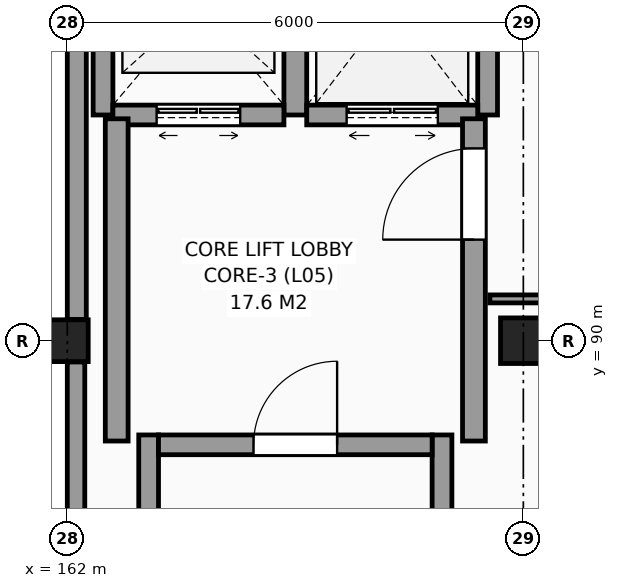
"""IFC4 building model, lengths in metres.
Left out: names, types, materials, properties, quantities, classifications, styles, units other than length and angle.
Written with IfcOpenShell. Run it as: python <this file> out.ifc"""

import sys

from ifc_helpers import new_model, si_unit, direction, frame, frame_2d, origin, origin_2d, place, context, subcontext, project, spatial, rectangle, extrude, element, fill, save


model = new_model("IFC4")
c1 = context("Model", 3, precision=1e-05, world=origin(), true_north=direction((0.0, 1.0)))
c2 = subcontext(c1, "Body", "Model", "MODEL_VIEW")
j1 = project(units=[si_unit("LENGTHUNIT", "METRE"), si_unit("PLANEANGLEUNIT", "RADIAN")], contexts=[c1])
p1 = place(None, origin())
s1 = spatial("IfcSite", under=j1, at=p1, CompositionType="ELEMENT")
p2 = place(p1, origin())
s2 = spatial("IfcBuilding", under=s1, at=p2, CompositionType="ELEMENT")
p3 = place(p2, frame((0.0, 0.0, 24.6)))
s3 = spatial("IfcBuildingStorey", under=s2, at=p3, CompositionType="ELEMENT", Elevation=24.6)
p4 = place(p3, frame((162.0, 90.0, 0.0), z_axis=(0.0, 0.0, 1.0), x_axis=(1.0, 0.0, 0.0)))
e1 = element("IfcColumn", 1, at=p4, inside=s3, PredefinedType="COLUMN", context=c2, shape_type="SweptSolid", body=[
    extrude(rectangle(XDim=0.55, YDim=0.55, at=origin_2d()), origin(), (0.0, 0.0, 1.0), 3.6),
])
p5 = place(p3, frame((168.0, 90.0, 0.0), z_axis=(0.0, 0.0, 1.0), x_axis=(1.0, 0.0, 0.0)))
e2 = element("IfcColumn", 2, at=p5, inside=s3, PredefinedType="COLUMN", context=c2, shape_type="SweptSolid", body=[
    extrude(rectangle(XDim=0.6, YDim=0.6, at=origin_2d()), origin(), (0.0, 0.0, 1.0), 3.6),
])
p6 = place(p3, frame((162.125, 95.72, 0.0), z_axis=(0.0, 0.0, 1.0), x_axis=(0.0, -1.0, 0.0)))
e3 = element("IfcWall", 3, at=p6, inside=s3, PredefinedType="SOLIDWALL", context=c2, shape_type="SweptSolid", body=[
    extrude(rectangle(XDim=5.44, YDim=0.25, at=frame_2d((2.72, 0.0))), origin(), (0.0, 0.0, 1.0), 2.73),
])
p7 = place(p3, frame((162.115, 89.72, 0.0), z_axis=(0.0, 0.0, 1.0), x_axis=(0.0, -1.0, 0.0)))
e4 = element("IfcWall", 4, at=p7, inside=s3, PredefinedType="SOLIDWALL", context=c2, shape_type="SweptSolid", body=[
    extrude(rectangle(XDim=5.44, YDim=0.23, at=frame_2d((2.72, 0.0))), origin(), (0.0, 0.0, 1.0), 2.73),
])
for number, where, z_axis, x_axis in (
    (5, (163.07, 78.04, 0.0), (0.0, 0.0, 1.0), (0.0, 1.0, 0.0)),
    (6, (166.93, 78.04, 0.0), (0.0, 0.0, 1.0), (0.0, 1.0, 0.0)),
):
    element("IfcWall", number, at=place(p3, frame(where, z_axis=z_axis, x_axis=x_axis)), inside=s3, PredefinedType="SHEAR", context=c2, shape_type="SweptSolid", body=[
        extrude(rectangle(XDim=10.72, YDim=0.26, at=frame_2d((5.36, 0.0))), origin(), (0.0, 0.0, 1.0), 3.6),
    ])
p8 = place(p3, frame((163.2, 88.63, 0.0), z_axis=(0.0, 0.0, 1.0), x_axis=(1.0, 0.0, 0.0)))
e7 = element("IfcWall", 7, at=p8, inside=s3, PredefinedType="SHEAR", context=c2, shape_type="SweptSolid", body=[
    extrude(rectangle(XDim=3.6, YDim=0.26, at=frame_2d((1.8, 0.0))), origin(), (0.0, 0.0, 1.0), 3.6),
])
p9 = place(p8, frame((1.25, 0.0, 0.0)))
e8 = element("IfcOpeningElement", 8, at=p9, cuts=e7, PredefinedType="OPENING", context=c2, shape_type="SweptSolid", body=[
    extrude(rectangle(XDim=1.1, YDim=2.15, at=frame_2d((0.55, 1.075))), frame((0.0, 0.14, 0.0), z_axis=(0.0, -1.0, 0.0), x_axis=(1.0, 0.0, 0.0)), (0.0, 0.0, 1.0), 0.28),
])
p10 = place(p3, frame((162.47, 92.97, 0.0), z_axis=(0.0, 0.0, 1.0), x_axis=(0.0, 1.0, 0.0)))
e9 = element("IfcWall", 9, at=p10, inside=s3, PredefinedType="SHEAR", context=c2, shape_type="SweptSolid", body=[
    extrude(rectangle(XDim=2.91, YDim=0.26, at=frame_2d((1.455, 0.0))), origin(), (0.0, 0.0, 1.0), 3.6),
])
p11 = place(p3, frame((165.0, 92.97, 0.0), z_axis=(0.0, 0.0, 1.0), x_axis=(0.0, 1.0, 0.0)))
e10 = element("IfcWall", 10, at=p11, inside=s3, PredefinedType="SHEAR", context=c2, shape_type="SweptSolid", body=[
    extrude(rectangle(XDim=2.91, YDim=0.3, at=frame_2d((1.455, 0.0))), origin(), (0.0, 0.0, 1.0), 3.6),
])
p12 = place(p3, frame((162.6, 92.97, 0.0), z_axis=(0.0, 0.0, 1.0), x_axis=(1.0, 0.0, 0.0)))
e11 = element("IfcWall", 11, at=p12, inside=s3, PredefinedType="SHEAR", context=c2, shape_type="SweptSolid", body=[
    extrude(rectangle(XDim=2.25, YDim=0.26, at=frame_2d((1.125, 0.0))), origin(), (0.0, 0.0, 1.0), 3.6),
])
p13 = place(p12, frame((0.575, 0.0, 0.0)))
e12 = element("IfcOpeningElement", 12, at=p13, cuts=e11, PredefinedType="OPENING", context=c2, shape_type="SweptSolid", body=[
    extrude(rectangle(XDim=1.1, YDim=2.2, at=frame_2d((0.55, 1.1))), frame((0.0, 0.14, 0.0), z_axis=(0.0, -1.0, 0.0), x_axis=(1.0, 0.0, 0.0)), (0.0, 0.0, 1.0), 0.28),
])
p14 = place(p3, frame((167.53, 92.97, 0.0), z_axis=(0.0, 0.0, 1.0), x_axis=(0.0, 1.0, 0.0)))
e13 = element("IfcWall", 13, at=p14, inside=s3, PredefinedType="SHEAR", context=c2, shape_type="SweptSolid", body=[
    extrude(rectangle(XDim=2.91, YDim=0.26, at=frame_2d((1.455, 0.0))), origin(), (0.0, 0.0, 1.0), 3.6),
])
p15 = place(p3, frame((165.15, 92.97, 0.0), z_axis=(0.0, 0.0, 1.0), x_axis=(1.0, 0.0, 0.0)))
e14 = element("IfcWall", 14, at=p15, inside=s3, PredefinedType="SHEAR", context=c2, shape_type="SweptSolid", body=[
    extrude(rectangle(XDim=2.25, YDim=0.26, at=frame_2d((1.125, 0.0))), origin(), (0.0, 0.0, 1.0), 3.6),
])
p16 = place(p15, frame((0.525, 0.0, 0.0)))
e15 = element("IfcOpeningElement", 15, at=p16, cuts=e14, PredefinedType="OPENING", context=c2, shape_type="SweptSolid", body=[
    extrude(rectangle(XDim=1.2, YDim=2.25, at=frame_2d((0.6, 1.125))), frame((0.0, 0.14, 0.0), z_axis=(0.0, -1.0, 0.0), x_axis=(1.0, 0.0, 0.0)), (0.0, 0.0, 1.0), 0.28),
])
p17 = place(p3, frame((167.35, 88.68, 0.0), z_axis=(0.0, 0.0, 1.0), x_axis=(0.0, 1.0, 0.0)))
e16 = element("IfcWall", 16, at=p17, inside=s3, PredefinedType="SHEAR", context=c2, shape_type="SweptSolid", body=[
    extrude(rectangle(XDim=4.24, YDim=0.3, at=frame_2d((2.12, 0.0))), origin(), (0.0, 0.0, 1.0), 3.6),
])
p18 = place(p17, frame((2.65, 0.0, 0.0)))
e17 = element("IfcOpeningElement", 17, at=p18, cuts=e16, PredefinedType="OPENING", context=c2, shape_type="SweptSolid", body=[
    extrude(rectangle(XDim=1.2, YDim=2.2, at=frame_2d((0.6, 1.1))), frame((0.0, 0.16, 0.0), z_axis=(0.0, -1.0, 0.0), x_axis=(1.0, 0.0, 0.0)), (0.0, 0.0, 1.0), 0.32),
])
p19 = place(p3, frame((162.65, 88.68, 0.0), z_axis=(0.0, 0.0, 1.0), x_axis=(0.0, 1.0, 0.0)))
e18 = element("IfcWall", 18, at=p19, inside=s3, PredefinedType="SHEAR", context=c2, shape_type="SweptSolid", body=[
    extrude(rectangle(XDim=4.24, YDim=0.3, at=frame_2d((2.12, 0.0))), origin(), (0.0, 0.0, 1.0), 3.6),
])
p20 = place(p3, frame((167.56, 90.55, 0.0), z_axis=(0.0, 0.0, 1.0), x_axis=(1.0, 0.0, 0.0)))
e19 = element("IfcWall", 19, at=p20, inside=s3, PredefinedType="PARTITIONING", context=c2, shape_type="SweptSolid", body=[
    extrude(rectangle(XDim=2.24, YDim=0.105, at=frame_2d((1.12, 0.0))), origin(), (0.0, 0.0, 1.0), 3.38),
])
p21 = place(p9, origin())
e20 = element("IfcDoor", 20, at=p21, inside=s3, OperationType="SINGLE_SWING_RIGHT", PredefinedType="DOOR", context=c2, shape_type="SweptSolid", body=[
    extrude(rectangle(XDim=1.1, YDim=2.15, at=frame_2d((0.55, 1.075))), frame((0.0, 0.025, 0.0), z_axis=(0.0, -1.0, 0.0), x_axis=(1.0, 0.0, 0.0)), (0.0, 0.0, 1.0), 0.05),
])
fill(e8, e20)
p22 = place(p13, origin())
e21 = element("IfcDoor", 21, at=p22, inside=s3, OperationType="DOUBLE_DOOR_SLIDING", PredefinedType="DOOR", context=c2, shape_type="SweptSolid", body=[
    extrude(rectangle(XDim=1.1, YDim=2.2, at=frame_2d((0.55, 1.1))), frame((0.0, 0.025, 0.0), z_axis=(0.0, -1.0, 0.0), x_axis=(1.0, 0.0, 0.0)), (0.0, 0.0, 1.0), 0.05),
])
fill(e12, e21)
p23 = place(p16, origin())
e22 = element("IfcDoor", 22, at=p23, inside=s3, OperationType="DOUBLE_DOOR_SLIDING", PredefinedType="DOOR", context=c2, shape_type="SweptSolid", body=[
    extrude(rectangle(XDim=1.2, YDim=2.25, at=frame_2d((0.6, 1.125))), frame((0.0, 0.025, 0.0), z_axis=(0.0, -1.0, 0.0), x_axis=(1.0, 0.0, 0.0)), (0.0, 0.0, 1.0), 0.05),
])
fill(e15, e22)
p24 = place(p18, origin())
e23 = element("IfcDoor", 23, at=p24, inside=s3, OperationType="SINGLE_SWING_LEFT", PredefinedType="DOOR", context=c2, shape_type="SweptSolid", body=[
    extrude(rectangle(XDim=1.2, YDim=2.2, at=frame_2d((0.6, 1.1))), frame((0.0, 0.025, 0.0), z_axis=(0.0, -1.0, 0.0), x_axis=(1.0, 0.0, 0.0)), (0.0, 0.0, 1.0), 0.05),
])
fill(e17, e23)
save(model, sys.argv[1])
